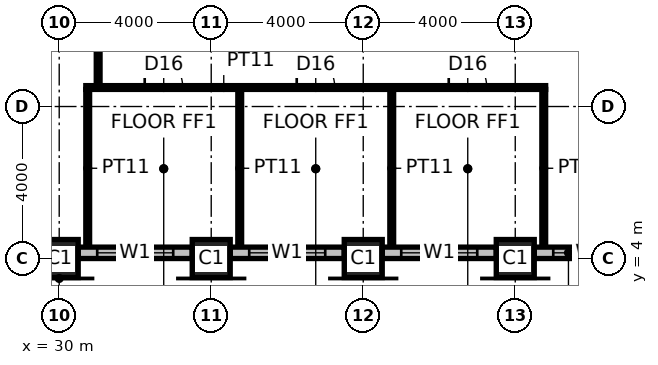
"""IFC4 building model, lengths in metres.
Left out: names, types, materials, properties, quantities, classifications, styles, units other than length and angle.
Written with IfcOpenShell. Run it as: python <this file> out.ifc"""

import sys

from ifc_helpers import new_model, si_unit, direction, frame, frame_2d, origin, origin_2d, place, context, subcontext, project, spatial, rectangle, hollow_rectangle, extrude, element, fill, save


model = new_model("IFC4")
c1 = context("Model", 3, precision=1e-05, world=origin(), true_north=direction((0.0, 1.0)))
c2 = subcontext(c1, "Body", "Model", "MODEL_VIEW")
j1 = project(units=[si_unit("LENGTHUNIT", "METRE"), si_unit("PLANEANGLEUNIT", "RADIAN")], contexts=[c1])
p1 = place(None, origin())
s1 = spatial("IfcSite", under=j1, at=p1, CompositionType="ELEMENT")
p2 = place(p1, origin())
s2 = spatial("IfcBuilding", under=s1, at=p2, CompositionType="ELEMENT")
p3 = place(p2, frame((0.0, 0.0, 246.2)))
s3 = spatial("IfcBuildingStorey", under=s2, at=p3, CompositionType="ELEMENT", Elevation=246.2)
for number, where, z_axis, x_axis in (
    (1, (30.0, 4.0, 0.0), (0.0, 0.0, 1.0), (1.0, 0.0, 0.0)),
    (2, (34.0, 4.0, 0.0), (0.0, 0.0, 1.0), (1.0, 0.0, 0.0)),
    (3, (38.0, 4.0, 0.0), (0.0, 0.0, 1.0), (1.0, 0.0, 0.0)),
    (4, (42.0, 4.0, 0.0), (0.0, 0.0, 1.0), (1.0, 0.0, 0.0)),
):
    element("IfcColumn", number, at=place(p3, frame(where, z_axis=z_axis, x_axis=x_axis)), inside=s3, PredefinedType="COLUMN", context=c2, shape_type="SweptSolid", body=[
        extrude(hollow_rectangle(XDim=1.0, YDim=1.0, WallThickness=0.1, at=origin_2d()), origin(), (0.0, 0.0, 1.0), 4.0),
    ])
p4 = place(p3, frame((30.7, 8.5, 0.0), z_axis=(0.0, 0.0, 1.0), x_axis=(1.0, 0.0, 0.0)))
e5 = element("IfcWall", 5, at=p4, inside=s3, PredefinedType="PARTITIONING", context=c2, shape_type="SweptSolid", body=[
    extrude(rectangle(XDim=12.1, YDim=0.1, at=frame_2d((6.05, 0.0))), origin(), (0.0, 0.0, 1.0), 3.85),
])
p5 = place(p4, frame((1.55, 0.0, 0.0)))
e6 = element("IfcOpeningElement", 6, at=p5, cuts=e5, PredefinedType="OPENING", context=c2, shape_type="SweptSolid", body=[
    extrude(rectangle(XDim=1.0, YDim=2.2, at=frame_2d((0.5, 1.1))), frame((0.0, 0.06, 0.0), z_axis=(0.0, -1.0, 0.0), x_axis=(1.0, 0.0, 0.0)), (0.0, 0.0, 1.0), 0.12),
])
p6 = place(p4, frame((5.55, 0.0, 0.0)))
e7 = element("IfcOpeningElement", 7, at=p6, cuts=e5, PredefinedType="OPENING", context=c2, shape_type="SweptSolid", body=[
    extrude(rectangle(XDim=1.0, YDim=2.2, at=frame_2d((0.5, 1.1))), frame((0.0, 0.06, 0.0), z_axis=(0.0, -1.0, 0.0), x_axis=(1.0, 0.0, 0.0)), (0.0, 0.0, 1.0), 0.12),
])
p7 = place(p4, frame((9.55, 0.0, 0.0)))
e8 = element("IfcOpeningElement", 8, at=p7, cuts=e5, PredefinedType="OPENING", context=c2, shape_type="SweptSolid", body=[
    extrude(rectangle(XDim=1.0, YDim=2.2, at=frame_2d((0.5, 1.1))), frame((0.0, 0.06, 0.0), z_axis=(0.0, -1.0, 0.0), x_axis=(1.0, 0.0, 0.0)), (0.0, 0.0, 1.0), 0.12),
])
for number, where, z_axis, x_axis in (
    (9, (30.75, 4.3, 0.0), (0.0, 0.0, 1.0), (0.0, 1.0, 0.0)),
    (10, (34.75, 4.3, 0.0), (0.0, 0.0, 1.0), (0.0, 1.0, 0.0)),
    (11, (38.75, 4.3, 0.0), (0.0, 0.0, 1.0), (0.0, 1.0, 0.0)),
    (12, (42.75, 4.3, 0.0), (0.0, 0.0, 1.0), (0.0, 1.0, 0.0)),
):
    element("IfcWall", number, at=place(p3, frame(where, z_axis=z_axis, x_axis=x_axis)), inside=s3, PredefinedType="PARTITIONING", context=c2, shape_type="SweptSolid", body=[
        extrude(rectangle(XDim=4.15, YDim=0.1, at=frame_2d((2.075, 0.0))), origin(), (0.0, 0.0, 1.0), 3.85),
    ])
p8 = place(p3, frame((31.025, 15.7, 0.0), z_axis=(0.0, 0.0, 1.0), x_axis=(0.0, -1.0, 0.0)))
e13 = element("IfcWall", 13, at=p8, inside=s3, PredefinedType="PARTITIONING", context=c2, shape_type="SweptSolid", body=[
    extrude(rectangle(XDim=7.15, YDim=0.1, at=frame_2d((3.575, 0.0))), origin(), (0.0, 0.0, 1.0), 3.85),
])
p9 = place(p8, frame((3.075, 0.0, 0.0)))
e14 = element("IfcOpeningElement", 14, at=p9, cuts=e13, PredefinedType="OPENING", context=c2, shape_type="SweptSolid", body=[
    extrude(rectangle(XDim=1.0, YDim=2.2, at=frame_2d((0.5, 1.1))), frame((0.0, 0.06, 0.0), z_axis=(0.0, -1.0, 0.0), x_axis=(1.0, 0.0, 0.0)), (0.0, 0.0, 1.0), 0.12),
])
p10 = place(p3, frame((30.5, 4.15, 0.0), z_axis=(0.0, 0.0, 1.0), x_axis=(1.0, 0.0, 0.0)))
e15 = element("IfcWall", 15, at=p10, inside=s3, PredefinedType="ELEMENTEDWALL", context=c2, shape_type="SweptSolid", body=[
    extrude(rectangle(XDim=3.0, YDim=0.3, at=frame_2d((1.5, 0.0))), origin(), (0.0, 0.0, 1.0), 2.85),
])
p11 = place(p10, frame((0.5, 0.0, 0.8)))
e16 = element("IfcOpeningElement", 16, at=p11, cuts=e15, PredefinedType="OPENING", context=c2, shape_type="SweptSolid", body=[
    extrude(rectangle(XDim=2.0, YDim=2.0, at=frame_2d((1.0, 1.0))), frame((0.0, 0.16, 0.0), z_axis=(0.0, -1.0, 0.0), x_axis=(1.0, 0.0, 0.0)), (0.0, 0.0, 1.0), 0.32),
])
p12 = place(p3, frame((34.5, 4.15, 0.0), z_axis=(0.0, 0.0, 1.0), x_axis=(1.0, 0.0, 0.0)))
e17 = element("IfcWall", 17, at=p12, inside=s3, PredefinedType="ELEMENTEDWALL", context=c2, shape_type="SweptSolid", body=[
    extrude(rectangle(XDim=3.0, YDim=0.3, at=frame_2d((1.5, 0.0))), origin(), (0.0, 0.0, 1.0), 2.85),
])
p13 = place(p12, frame((0.5, 0.0, 0.8)))
e18 = element("IfcOpeningElement", 18, at=p13, cuts=e17, PredefinedType="OPENING", context=c2, shape_type="SweptSolid", body=[
    extrude(rectangle(XDim=2.0, YDim=2.0, at=frame_2d((1.0, 1.0))), frame((0.0, 0.16, 0.0), z_axis=(0.0, -1.0, 0.0), x_axis=(1.0, 0.0, 0.0)), (0.0, 0.0, 1.0), 0.32),
])
p14 = place(p3, frame((38.5, 4.15, 0.0), z_axis=(0.0, 0.0, 1.0), x_axis=(1.0, 0.0, 0.0)))
e19 = element("IfcWall", 19, at=p14, inside=s3, PredefinedType="ELEMENTEDWALL", context=c2, shape_type="SweptSolid", body=[
    extrude(rectangle(XDim=3.0, YDim=0.3, at=frame_2d((1.5, 0.0))), origin(), (0.0, 0.0, 1.0), 2.85),
])
p15 = place(p14, frame((0.5, 0.0, 0.8)))
e20 = element("IfcOpeningElement", 20, at=p15, cuts=e19, PredefinedType="OPENING", context=c2, shape_type="SweptSolid", body=[
    extrude(rectangle(XDim=2.0, YDim=2.0, at=frame_2d((1.0, 1.0))), frame((0.0, 0.16, 0.0), z_axis=(0.0, -1.0, 0.0), x_axis=(1.0, 0.0, 0.0)), (0.0, 0.0, 1.0), 0.32),
])
p16 = place(p3, frame((42.5, 4.15, 0.0), z_axis=(0.0, 0.0, 1.0), x_axis=(1.0, 0.0, 0.0)))
e21 = element("IfcWall", 21, at=p16, inside=s3, PredefinedType="ELEMENTEDWALL", context=c2, shape_type="SweptSolid", body=[
    extrude(rectangle(XDim=3.0, YDim=0.3, at=frame_2d((1.5, 0.0))), origin(), (0.0, 0.0, 1.0), 2.85),
])
p17 = place(p16, frame((0.5, 0.0, 0.8)))
e22 = element("IfcOpeningElement", 22, at=p17, cuts=e21, PredefinedType="OPENING", context=c2, shape_type="SweptSolid", body=[
    extrude(rectangle(XDim=2.0, YDim=2.0, at=frame_2d((1.0, 1.0))), frame((0.0, 0.16, 0.0), z_axis=(0.0, -1.0, 0.0), x_axis=(1.0, 0.0, 0.0)), (0.0, 0.0, 1.0), 0.32),
])
p18 = place(p5, origin())
e23 = element("IfcDoor", 23, at=p18, inside=s3, OperationType="SINGLE_SWING_LEFT", PredefinedType="DOOR", context=c2, shape_type="SweptSolid", body=[
    extrude(rectangle(XDim=1.0, YDim=2.2, at=frame_2d((0.5, 1.1))), frame((0.0, 0.025, 0.0), z_axis=(0.0, -1.0, 0.0), x_axis=(1.0, 0.0, 0.0)), (0.0, 0.0, 1.0), 0.05),
])
fill(e6, e23)
p19 = place(p6, origin())
e24 = element("IfcDoor", 24, at=p19, inside=s3, OperationType="SINGLE_SWING_LEFT", PredefinedType="DOOR", context=c2, shape_type="SweptSolid", body=[
    extrude(rectangle(XDim=1.0, YDim=2.2, at=frame_2d((0.5, 1.1))), frame((0.0, 0.025, 0.0), z_axis=(0.0, -1.0, 0.0), x_axis=(1.0, 0.0, 0.0)), (0.0, 0.0, 1.0), 0.05),
])
fill(e7, e24)
p20 = place(p7, origin())
e25 = element("IfcDoor", 25, at=p20, inside=s3, OperationType="SINGLE_SWING_LEFT", PredefinedType="DOOR", context=c2, shape_type="SweptSolid", body=[
    extrude(rectangle(XDim=1.0, YDim=2.2, at=frame_2d((0.5, 1.1))), frame((0.0, 0.025, 0.0), z_axis=(0.0, -1.0, 0.0), x_axis=(1.0, 0.0, 0.0)), (0.0, 0.0, 1.0), 0.05),
])
fill(e8, e25)
p21 = place(p11, origin())
e26 = element("IfcWindow", 26, at=p21, inside=s3, PartitioningType="SINGLE_PANEL", PredefinedType="WINDOW", context=c2, shape_type="SweptSolid", body=[
    extrude(rectangle(XDim=2.0, YDim=2.0, at=frame_2d((1.0, 1.0))), frame((0.0, 0.03, 0.0), z_axis=(0.0, -1.0, 0.0), x_axis=(1.0, 0.0, 0.0)), (0.0, 0.0, 1.0), 0.06),
])
fill(e16, e26)
p22 = place(p13, origin())
e27 = element("IfcWindow", 27, at=p22, inside=s3, PartitioningType="SINGLE_PANEL", PredefinedType="WINDOW", context=c2, shape_type="SweptSolid", body=[
    extrude(rectangle(XDim=2.0, YDim=2.0, at=frame_2d((1.0, 1.0))), frame((0.0, 0.03, 0.0), z_axis=(0.0, -1.0, 0.0), x_axis=(1.0, 0.0, 0.0)), (0.0, 0.0, 1.0), 0.06),
])
fill(e18, e27)
p23 = place(p15, origin())
e28 = element("IfcWindow", 28, at=p23, inside=s3, PartitioningType="SINGLE_PANEL", PredefinedType="WINDOW", context=c2, shape_type="SweptSolid", body=[
    extrude(rectangle(XDim=2.0, YDim=2.0, at=frame_2d((1.0, 1.0))), frame((0.0, 0.03, 0.0), z_axis=(0.0, -1.0, 0.0), x_axis=(1.0, 0.0, 0.0)), (0.0, 0.0, 1.0), 0.06),
])
fill(e20, e28)
p24 = place(p17, origin())
e29 = element("IfcWindow", 29, at=p24, inside=s3, PartitioningType="SINGLE_PANEL", PredefinedType="WINDOW", context=c2, shape_type="SweptSolid", body=[
    extrude(rectangle(XDim=2.0, YDim=2.0, at=frame_2d((1.0, 1.0))), frame((0.0, 0.03, 0.0), z_axis=(0.0, -1.0, 0.0), x_axis=(1.0, 0.0, 0.0)), (0.0, 0.0, 1.0), 0.06),
])
fill(e22, e29)
save(model, sys.argv[1])
